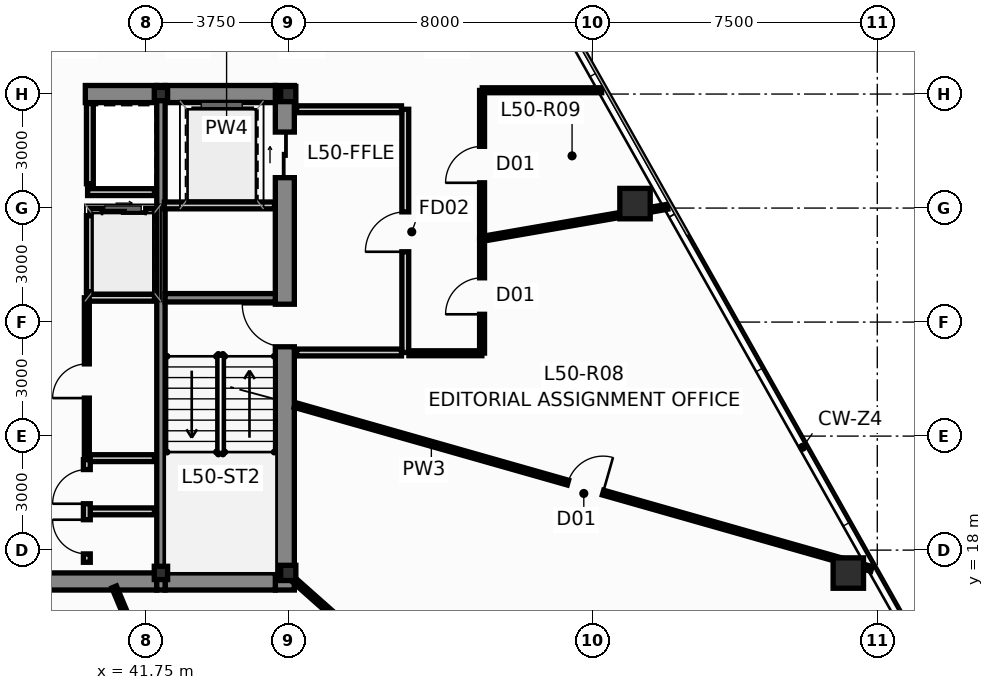
"""IFC4 building model, lengths in metres.
Left out: names, types, materials, properties, quantities, classifications, styles, units other than length and angle.
Written with IfcOpenShell. Run it as: python <this file> out.ifc"""

import sys

from ifc_helpers import new_model, si_unit, direction, frame, frame_2d, origin, origin_2d, place, context, subcontext, project, spatial, rectangle, hollow_rectangle, i_section, extrude, source, transform, mapped, element, fill, save


model = new_model("IFC4")
c1 = context("Model", 3, precision=1e-05, world=origin(), true_north=direction((0.0, 1.0)))
c2 = subcontext(c1, "Body", "Model", "MODEL_VIEW")
j1 = project(units=[si_unit("LENGTHUNIT", "METRE"), si_unit("PLANEANGLEUNIT", "RADIAN")], contexts=[c1])
p1 = place(None, origin())
s1 = spatial("IfcSite", under=j1, at=p1, CompositionType="ELEMENT")
p2 = place(p1, origin())
s2 = spatial("IfcBuilding", under=s1, at=p2, CompositionType="ELEMENT")
p3 = place(p2, frame((0.0, 0.0, 191.35)))
s3 = spatial("IfcBuildingStorey", under=s2, at=p3, CompositionType="ELEMENT", Elevation=191.35)
m1 = source(origin(), c2, "Body", "SweptSolid", [
    extrude(i_section(OverallWidth=0.4, OverallDepth=0.4, WebThickness=0.02, FlangeThickness=0.032, at=origin_2d()), origin(), (0.0, 0.0, 1.0), 3.65),
])
for number, where, z_axis, x_axis in (
    (1, (45.5, 17.4, 0.0), (0.0, 0.0, 1.0), (1.0, 0.0, 0.0)),
    (2, (45.5, 30.0, 0.0), (0.0, 0.0, 1.0), (1.0, 0.0, 0.0)),
):
    element("IfcColumn", number, at=place(p3, frame(where, z_axis=z_axis, x_axis=x_axis)), inside=s3, PredefinedType="COLUMN", context=c2, shape_type="MappedRepresentation", body=[
        mapped(m1, transform((0.0, 0.0, 0.0), scale=1.0)),
    ])
m2 = source(origin(), c2, "Body", "SweptSolid", [
    extrude(hollow_rectangle(XDim=0.35, YDim=0.35, WallThickness=0.016, at=origin_2d()), origin(), (0.0, 0.0, 1.0), 3.65),
])
for number, where, z_axis, x_axis in (
    (3, (42.15, 17.4, 0.0), (0.0, 0.0, 1.0), (1.0, 0.0, 0.0)),
    (4, (42.15, 30.0, 0.0), (0.0, 0.0, 1.0), (1.0, 0.0, 0.0)),
):
    element("IfcColumn", number, at=place(p3, frame(where, z_axis=z_axis, x_axis=x_axis)), inside=s3, PredefinedType="COLUMN", context=c2, shape_type="MappedRepresentation", body=[
        mapped(m2, transform((0.0, 0.0, 0.0), scale=1.0)),
    ])
p4 = place(p3, frame((45.41, 16.95, 0.0), z_axis=(0.0, 0.0, 1.0), x_axis=(0.0, 1.0, 0.0)))
e5 = element("IfcWall", 5, at=p4, inside=s3, PredefinedType="SHEAR", context=c2, shape_type="SweptSolid", body=[
    extrude(rectangle(XDim=13.275, YDim=0.5, at=frame_2d((6.638, 0.0))), origin(), (0.0, 0.0, 1.0), 3.65),
])
p5 = place(p4, frame((6.4, 0.0, 0.0)))
e6 = element("IfcOpeningElement", 6, at=p5, cuts=e5, PredefinedType="OPENING", context=c2, shape_type="SweptSolid", body=[
    extrude(rectangle(XDim=1.12, YDim=2.15, at=frame_2d((0.56, 1.075))), frame((0.0, 0.262, 0.0), z_axis=(0.0, -1.0, 0.0), x_axis=(1.0, 0.0, 0.0)), (0.0, 0.0, 1.0), 0.524),
])
p6 = place(p4, frame((10.85, 0.0, 0.0)))
e7 = element("IfcOpeningElement", 7, at=p6, cuts=e5, PredefinedType="OPENING", context=c2, shape_type="SweptSolid", body=[
    extrude(rectangle(XDim=1.2, YDim=2.2, at=frame_2d((0.6, 1.1))), frame((0.0, 0.262, 0.0), z_axis=(0.0, -1.0, 0.0), x_axis=(1.0, 0.0, 0.0)), (0.0, 0.0, 1.0), 0.524),
])
p7 = place(p3, frame((33.96, 17.175, 0.0), z_axis=(0.0, 0.0, 1.0), x_axis=(1.0, 0.0, 0.0)))
e8 = element("IfcWall", 8, at=p7, inside=s3, PredefinedType="SHEAR", context=c2, shape_type="SweptSolid", body=[
    extrude(rectangle(XDim=8.08, YDim=0.45, at=frame_2d((4.04, 0.0))), origin(), (0.0, 0.0, 1.0), 3.65),
])
p8 = place(p3, frame((42.26, 17.175, 0.0), z_axis=(0.0, 0.0, 1.0), x_axis=(1.0, 0.0, 0.0)))
e9 = element("IfcWall", 9, at=p8, inside=s3, PredefinedType="SHEAR", context=c2, shape_type="SweptSolid", body=[
    extrude(rectangle(XDim=2.9, YDim=0.45, at=frame_2d((1.45, 0.0))), origin(), (0.0, 0.0, 1.0), 3.65),
])
p9 = place(p3, frame((40.16, 30.0, 0.0), z_axis=(0.0, 0.0, 1.0), x_axis=(1.0, 0.0, 0.0)))
e10 = element("IfcWall", 10, at=p9, inside=s3, PredefinedType="SHEAR", context=c2, shape_type="SweptSolid", body=[
    extrude(rectangle(XDim=1.88, YDim=0.45, at=frame_2d((0.94, 0.0))), origin(), (0.0, 0.0, 1.0), 3.65),
])
p10 = place(p3, frame((42.26, 30.0, 0.0), z_axis=(0.0, 0.0, 1.0), x_axis=(1.0, 0.0, 0.0)))
e11 = element("IfcWall", 11, at=p10, inside=s3, PredefinedType="SHEAR", context=c2, shape_type="SweptSolid", body=[
    extrude(rectangle(XDim=2.9, YDim=0.45, at=frame_2d((1.45, 0.0))), origin(), (0.0, 0.0, 1.0), 3.65),
])
p11 = place(p3, frame((42.15, 16.95, 0.0), z_axis=(0.0, 0.0, 1.0), x_axis=(0.0, 1.0, 0.0)))
e12 = element("IfcWall", 12, at=p11, inside=s3, PredefinedType="SHEAR", context=c2, shape_type="SweptSolid", body=[
    extrude(rectangle(XDim=13.275, YDim=0.22, at=frame_2d((6.638, 0.0))), origin(), (0.0, 0.0, 1.0), 3.65),
])
p12 = place(p3, frame((42.26, 24.64, 0.0), z_axis=(0.0, 0.0, 1.0), x_axis=(1.0, 0.0, 0.0)))
e13 = element("IfcWall", 13, at=p12, inside=s3, PredefinedType="SHEAR", context=c2, shape_type="SweptSolid", body=[
    extrude(rectangle(XDim=2.9, YDim=0.22, at=frame_2d((1.45, 0.0))), origin(), (0.0, 0.0, 1.0), 3.65),
])
m3 = source(origin(), c2, "Body", "SweptSolid", [
    extrude(hollow_rectangle(XDim=0.8, YDim=0.8, WallThickness=0.045, at=origin_2d()), origin(), (0.0, 0.0, 1.0), 3.651),
])
p13 = place(p3, frame((60.238, 17.396, 0.0), z_axis=(-0.010364917199, -0.021599150033, 0.999712981415), x_axis=(0.901566609123, -0.432640323264, 0.0)))
e14 = element("IfcColumn", 14, at=p13, inside=s3, PredefinedType="COLUMN", context=c2, shape_type="MappedRepresentation", body=[
    mapped(m3, transform((0.0, 0.0, 0.0), scale=1.0)),
])
m4 = source(origin(), c2, "Body", "SweptSolid", [
    extrude(hollow_rectangle(XDim=0.8, YDim=0.8, WallThickness=0.045, at=origin_2d()), origin(), (0.0, 0.0, 1.0), 3.651),
])
p14 = place(p3, frame((54.625, 27.118, 0.0), z_axis=(-0.014913313399, -0.013776424037, 0.999793880369), x_axis=(0.678553674548, -0.734550822447, 0.0)))
e15 = element("IfcColumn", 15, at=p14, inside=s3, PredefinedType="COLUMN", context=c2, shape_type="MappedRepresentation", body=[
    mapped(m4, transform((0.0, 0.0, 0.0), scale=1.0)),
])
p15 = place(p3, frame((40.28, 26.9, 0.0), z_axis=(0.0, 0.0, 1.0), x_axis=(1.0, 0.0, 0.0)))
e16 = element("IfcWall", 16, at=p15, inside=s3, PredefinedType="PARTITIONING", context=c2, shape_type="SweptSolid", body=[
    extrude(rectangle(XDim=1.7, YDim=0.18, at=frame_2d((0.85, 0.0))), origin(), (0.0, 0.0, 1.0), 3.4),
])
p16 = place(p15, frame((0.32, 0.0, 0.0)))
e17 = element("IfcOpeningElement", 17, at=p16, cuts=e16, PredefinedType="OPENING", context=c2, shape_type="SweptSolid", body=[
    extrude(rectangle(XDim=1.15, YDim=2.2, at=frame_2d((0.575, 1.1))), frame((0.0, 0.102, 0.0), z_axis=(0.0, -1.0, 0.0), x_axis=(1.0, 0.0, 0.0)), (0.0, 0.0, 1.0), 0.204),
])
p17 = place(p3, frame((40.28, 24.8, 0.0), z_axis=(0.0, 0.0, 1.0), x_axis=(0.0, 1.0, 0.0)))
e18 = element("IfcWall", 18, at=p17, inside=s3, PredefinedType="PARTITIONING", context=c2, shape_type="SweptSolid", body=[
    extrude(rectangle(XDim=2.0, YDim=0.18, at=frame_2d((1.0, 0.0))), origin(), (0.0, 0.0, 1.0), 3.4),
])
p18 = place(p3, frame((40.2, 24.64, 0.0), z_axis=(0.0, 0.0, 1.0), x_axis=(1.0, 0.0, 0.0)))
e19 = element("IfcWall", 19, at=p18, inside=s3, PredefinedType="PARTITIONING", context=c2, shape_type="SweptSolid", body=[
    extrude(rectangle(XDim=1.78, YDim=0.18, at=frame_2d((0.89, 0.0))), origin(), (0.0, 0.0, 1.0), 3.4),
])
p19 = place(p3, frame((40.22, 27.42, 0.0), z_axis=(0.0, 0.0, 1.0), x_axis=(1.0, 0.0, 0.0)))
e20 = element("IfcWall", 20, at=p19, inside=s3, PredefinedType="PARTITIONING", context=c2, shape_type="SweptSolid", body=[
    extrude(rectangle(XDim=1.76, YDim=0.18, at=frame_2d((0.88, 0.0))), origin(), (0.0, 0.0, 1.0), 3.4),
])
p20 = place(p3, frame((40.28, 27.64, 0.0), z_axis=(0.0, 0.0, 1.0), x_axis=(0.0, 1.0, 0.0)))
e21 = element("IfcWall", 21, at=p20, inside=s3, PredefinedType="PARTITIONING", context=c2, shape_type="SweptSolid", body=[
    extrude(rectangle(XDim=2.11, YDim=0.18, at=frame_2d((1.055, 0.0))), origin(), (0.0, 0.0, 1.0), 3.4),
])
p21 = place(p3, frame((48.58, 23.2, 0.0), z_axis=(0.0, 0.0, 1.0), x_axis=(0.0, 1.0, 0.0)))
e22 = element("IfcWall", 22, at=p21, inside=s3, PredefinedType="PARTITIONING", context=c2, shape_type="SweptSolid", body=[
    extrude(rectangle(XDim=6.4, YDim=0.18, at=frame_2d((3.2, 0.0))), origin(), (0.0, 0.0, 1.0), 3.078),
])
p22 = place(p21, frame((2.65, 0.0, 0.0)))
e23 = element("IfcOpeningElement", 23, at=p22, cuts=e22, PredefinedType="OPENING", context=c2, shape_type="SweptSolid", body=[
    extrude(rectangle(XDim=1.05, YDim=2.15, at=frame_2d((0.525, 1.075))), frame((0.0, 0.102, 0.0), z_axis=(0.0, -1.0, 0.0), x_axis=(1.0, 0.0, 0.0)), (0.0, 0.0, 1.0), 0.204),
])
p23 = place(p3, frame((45.72, 23.2, 0.0), z_axis=(0.0, 0.0, 1.0), x_axis=(1.0, 0.0, 0.0)))
e24 = element("IfcWall", 24, at=p23, inside=s3, PredefinedType="PARTITIONING", context=c2, shape_type="SweptSolid", body=[
    extrude(rectangle(XDim=2.76, YDim=0.18, at=frame_2d((1.38, 0.0))), origin(), (0.0, 0.0, 1.0), 3.4),
])
p24 = place(p3, frame((45.72, 29.6, 0.0), z_axis=(0.0, 0.0, 1.0), x_axis=(1.0, 0.0, 0.0)))
e25 = element("IfcWall", 25, at=p24, inside=s3, PredefinedType="PARTITIONING", context=c2, shape_type="SweptSolid", body=[
    extrude(rectangle(XDim=2.76, YDim=0.18, at=frame_2d((1.38, 0.0))), origin(), (0.0, 0.0, 1.0), 2.925),
])
p25 = place(p3, frame((42.24, 27.07, 0.0), z_axis=(0.0, 0.0, 1.0), x_axis=(1.0, 0.0, 0.0)))
e26 = element("IfcWall", 26, at=p25, inside=s3, PredefinedType="PARTITIONING", context=c2, shape_type="SweptSolid", body=[
    extrude(rectangle(XDim=2.9, YDim=0.18, at=frame_2d((1.45, 0.0))), origin(), (0.0, 0.0, 1.0), 3.4),
])
p26 = place(p3, frame((40.22, 20.42, 0.0), z_axis=(0.0, 0.0, 1.0), x_axis=(1.0, 0.0, 0.0)))
e27 = element("IfcWall", 27, at=p26, inside=s3, PredefinedType="PARTITIONING", context=c2, shape_type="SweptSolid", body=[
    extrude(rectangle(XDim=1.76, YDim=0.18, at=frame_2d((0.88, 0.0))), origin(), (0.0, 0.0, 1.0), 3.4),
])
p27 = place(p3, frame((40.2, 20.5, 0.0), z_axis=(0.0, 0.0, 1.0), x_axis=(0.0, 1.0, 0.0)))
e28 = element("IfcWall", 28, at=p27, inside=s3, PredefinedType="PARTITIONING", context=c2, shape_type="SweptSolid", body=[
    extrude(rectangle(XDim=4.14, YDim=0.13, at=frame_2d((2.07, 0.0))), origin(), (0.0, 0.0, 1.0), 3.4),
])
p28 = place(p27, frame((1.5, 0.0, 0.0)))
e29 = element("IfcOpeningElement", 29, at=p28, cuts=e28, PredefinedType="OPENING", context=c2, shape_type="SweptSolid", body=[
    extrude(rectangle(XDim=0.9, YDim=2.1, at=frame_2d((0.45, 1.05))), frame((0.0, 0.077, 0.0), z_axis=(0.0, -1.0, 0.0), x_axis=(1.0, 0.0, 0.0)), (0.0, 0.0, 1.0), 0.154),
])
p29 = place(p3, frame((40.28, 19.02, 0.0), z_axis=(0.0, 0.0, 1.0), x_axis=(1.0, 0.0, 0.0)))
e30 = element("IfcWall", 30, at=p29, inside=s3, PredefinedType="PARTITIONING", context=c2, shape_type="SweptSolid", body=[
    extrude(rectangle(XDim=1.7, YDim=0.18, at=frame_2d((0.85, 0.0))), origin(), (0.0, 0.0, 1.0), 3.4),
])
p30 = place(p3, frame((40.2, 17.68, 0.0), z_axis=(0.0, 0.0, 1.0), x_axis=(0.0, 1.0, 0.0)))
e31 = element("IfcWall", 31, at=p30, inside=s3, PredefinedType="PARTITIONING", context=c2, shape_type="SweptSolid", body=[
    extrude(rectangle(XDim=2.7, YDim=0.18, at=frame_2d((1.35, 0.0))), origin(), (0.0, 0.0, 1.0), 3.4),
])
p31 = place(p30, frame((0.22, 0.0, 0.0)))
e32 = element("IfcOpeningElement", 32, at=p31, cuts=e31, PredefinedType="OPENING", context=c2, shape_type="SweptSolid", body=[
    extrude(rectangle(XDim=0.9, YDim=2.1, at=frame_2d((0.45, 1.05))), frame((0.0, 0.102, 0.0), z_axis=(0.0, -1.0, 0.0), x_axis=(1.0, 0.0, 0.0)), (0.0, 0.0, 1.0), 0.204),
])
p32 = place(p30, frame((1.54, 0.0, 0.0)))
e33 = element("IfcOpeningElement", 33, at=p32, cuts=e31, PredefinedType="OPENING", context=c2, shape_type="SweptSolid", body=[
    extrude(rectangle(XDim=0.9, YDim=2.1, at=frame_2d((0.45, 1.05))), frame((0.0, 0.102, 0.0), z_axis=(0.0, -1.0, 0.0), x_axis=(1.0, 0.0, 0.0)), (0.0, 0.0, 1.0), 0.204),
])
p33 = place(p3, frame((45.672, 21.819, 0.0), z_axis=(0.0, 0.0, 1.0), x_axis=(0.961885741186, -0.273451679282, 0.0)))
e34 = element("IfcWall", 34, at=p33, inside=s3, PredefinedType="PARTITIONING", context=c2, shape_type="SweptSolid", body=[
    extrude(rectangle(XDim=15.777, YDim=0.13, at=frame_2d((7.888, 0.0))), origin(), (0.0, 0.0, 1.0), 3.4),
])
p34 = place(p33, frame((7.472, 0.0, 0.0)))
e35 = element("IfcOpeningElement", 35, at=p34, cuts=e34, PredefinedType="OPENING", context=c2, shape_type="SweptSolid", body=[
    extrude(rectangle(XDim=0.96, YDim=2.15, at=frame_2d((0.48, 1.075))), frame((0.0, 0.077, 0.0), z_axis=(0.0, -1.0, 0.0), x_axis=(1.0, 0.0, 0.0)), (0.0, 0.0, 1.0), 0.154),
])
p35 = place(p3, frame((45.656, 17.21, 0.0), z_axis=(0.0, 0.0, 1.0), x_axis=(0.748196325474, -0.663477398671, 0.0)))
e36 = element("IfcWall", 36, at=p35, inside=s3, PredefinedType="PARTITIONING", context=c2, shape_type="SweptSolid", body=[
    extrude(rectangle(XDim=14.778, YDim=0.13, at=frame_2d((7.389, 0.0))), origin(), (0.0, 0.0, 1.0), 2.925),
])
p36 = place(p3, frame((40.919, 17.031, 0.0), z_axis=(0.0, 0.0, 1.0), x_axis=(0.385652967591, -0.922643912129, 0.0)))
e37 = element("IfcWall", 37, at=p36, inside=s3, PredefinedType="PARTITIONING", context=c2, shape_type="SweptSolid", body=[
    extrude(rectangle(XDim=10.657, YDim=0.13, at=frame_2d((5.329, 0.0))), origin(), (0.0, 0.0, 1.0), 3.4),
])
p37 = place(p36, frame((4.902, 0.0, 0.0)))
e38 = element("IfcOpeningElement", 38, at=p37, cuts=e37, PredefinedType="OPENING", context=c2, shape_type="SweptSolid", body=[
    extrude(rectangle(XDim=0.96, YDim=2.15, at=frame_2d((0.48, 1.075))), frame((0.0, 0.077, 0.0), z_axis=(0.0, -1.0, 0.0), x_axis=(1.0, 0.0, 0.0)), (0.0, 0.0, 1.0), 0.154),
])
p38 = place(p3, frame((50.605, 26.191, 0.0), z_axis=(0.0, 0.0, 1.0), x_axis=(0.985362153608, 0.170474121899, 0.0)))
e39 = element("IfcWall", 39, at=p38, inside=s3, PredefinedType="PARTITIONING", context=c2, shape_type="SweptSolid", body=[
    extrude(rectangle(XDim=4.944, YDim=0.13, at=frame_2d((2.472, 0.0))), origin(), (0.0, 0.0, 1.0), 3.4),
])
p39 = place(p3, frame((50.6, 26.195, 0.0), z_axis=(0.0, 0.0, 1.0), x_axis=(0.0, 1.0, 0.0)))
e40 = element("IfcWall", 40, at=p39, inside=s3, PredefinedType="PARTITIONING", context=c2, shape_type="SweptSolid", body=[
    extrude(rectangle(XDim=3.9, YDim=0.13, at=frame_2d((1.95, 0.0))), origin(), (0.0, 0.0, 1.0), 3.078),
])
p40 = place(p39, frame((1.47, 0.0, 0.0)))
e41 = element("IfcOpeningElement", 41, at=p40, cuts=e40, PredefinedType="OPENING", context=c2, shape_type="SweptSolid", body=[
    extrude(rectangle(XDim=0.96, YDim=2.15, at=frame_2d((0.48, 1.075))), frame((0.0, 0.077, 0.0), z_axis=(0.0, -1.0, 0.0), x_axis=(1.0, 0.0, 0.0)), (0.0, 0.0, 1.0), 0.154),
])
p41 = place(p3, frame((50.605, 30.1, 0.0), z_axis=(0.0, 0.0, 1.0), x_axis=(1.0, 0.0, 0.0)))
e42 = element("IfcWall", 42, at=p41, inside=s3, PredefinedType="PARTITIONING", context=c2, shape_type="SweptSolid", body=[
    extrude(rectangle(XDim=3.143, YDim=0.13, at=frame_2d((1.572, 0.0))), origin(), (0.0, 0.0, 1.0), 3.4),
])
p42 = place(p3, frame((50.6, 23.185, 0.0), z_axis=(0.0, 0.0, 1.0), x_axis=(0.0, 1.0, 0.0)))
e43 = element("IfcWall", 43, at=p42, inside=s3, PredefinedType="PARTITIONING", context=c2, shape_type="SweptSolid", body=[
    extrude(rectangle(XDim=3.0, YDim=0.13, at=frame_2d((1.5, 0.0))), origin(), (0.0, 0.0, 1.0), 3.078),
])
p43 = place(p42, frame((1.02, 0.0, 0.0)))
e44 = element("IfcOpeningElement", 44, at=p43, cuts=e43, PredefinedType="OPENING", context=c2, shape_type="SweptSolid", body=[
    extrude(rectangle(XDim=0.96, YDim=2.15, at=frame_2d((0.48, 1.075))), frame((0.0, 0.077, 0.0), z_axis=(0.0, -1.0, 0.0), x_axis=(1.0, 0.0, 0.0)), (0.0, 0.0, 1.0), 0.154),
])
p44 = place(p3, frame((48.675, 23.18, 0.0), z_axis=(0.0, 0.0, 1.0), x_axis=(1.0, 0.0, 0.0)))
e45 = element("IfcWall", 45, at=p44, inside=s3, PredefinedType="PARTITIONING", context=c2, shape_type="SweptSolid", body=[
    extrude(rectangle(XDim=1.92, YDim=0.13, at=frame_2d((0.96, 0.0))), origin(), (0.0, 0.0, 1.0), 3.4),
])
p45 = place(p5, origin())
e46 = element("IfcDoor", 46, at=p45, inside=s3, OperationType="SINGLE_SWING_RIGHT", PredefinedType="DOOR", context=c2, shape_type="SweptSolid", body=[
    extrude(rectangle(XDim=1.12, YDim=2.15, at=frame_2d((0.56, 1.075))), frame((0.0, 0.025, 0.0), z_axis=(0.0, -1.0, 0.0), x_axis=(1.0, 0.0, 0.0)), (0.0, 0.0, 1.0), 0.05),
])
fill(e6, e46)
p46 = place(p6, origin())
e47 = element("IfcDoor", 47, at=p46, inside=s3, OperationType="SLIDING_TO_RIGHT", PredefinedType="DOOR", context=c2, shape_type="SweptSolid", body=[
    extrude(rectangle(XDim=1.2, YDim=2.2, at=frame_2d((0.6, 1.1))), frame((0.0, 0.025, 0.0), z_axis=(0.0, -1.0, 0.0), x_axis=(1.0, 0.0, 0.0)), (0.0, 0.0, 1.0), 0.05),
])
fill(e7, e47)
p47 = place(p16, origin())
e48 = element("IfcDoor", 48, at=p47, inside=s3, OperationType="SLIDING_TO_LEFT", PredefinedType="DOOR", context=c2, shape_type="SweptSolid", body=[
    extrude(rectangle(XDim=1.15, YDim=2.2, at=frame_2d((0.575, 1.1))), frame((0.0, 0.025, 0.0), z_axis=(0.0, -1.0, 0.0), x_axis=(1.0, 0.0, 0.0)), (0.0, 0.0, 1.0), 0.05),
])
fill(e17, e48)
p48 = place(p22, origin())
e49 = element("IfcDoor", 49, at=p48, inside=s3, OperationType="SINGLE_SWING_LEFT", PredefinedType="DOOR", context=c2, shape_type="SweptSolid", body=[
    extrude(rectangle(XDim=1.05, YDim=2.15, at=frame_2d((0.525, 1.075))), frame((0.0, 0.025, 0.0), z_axis=(0.0, -1.0, 0.0), x_axis=(1.0, 0.0, 0.0)), (0.0, 0.0, 1.0), 0.05),
])
fill(e23, e49)
p49 = place(p28, origin())
e50 = element("IfcDoor", 50, at=p49, inside=s3, OperationType="SINGLE_SWING_LEFT", PredefinedType="DOOR", context=c2, shape_type="SweptSolid", body=[
    extrude(rectangle(XDim=0.9, YDim=2.1, at=frame_2d((0.45, 1.05))), frame((0.0, 0.025, 0.0), z_axis=(0.0, -1.0, 0.0), x_axis=(1.0, 0.0, 0.0)), (0.0, 0.0, 1.0), 0.05),
])
fill(e29, e50)
p50 = place(p31, origin())
e51 = element("IfcDoor", 51, at=p50, inside=s3, OperationType="SINGLE_SWING_RIGHT", PredefinedType="DOOR", context=c2, shape_type="SweptSolid", body=[
    extrude(rectangle(XDim=0.9, YDim=2.1, at=frame_2d((0.45, 1.05))), frame((0.0, 0.025, 0.0), z_axis=(0.0, -1.0, 0.0), x_axis=(1.0, 0.0, 0.0)), (0.0, 0.0, 1.0), 0.05),
])
fill(e32, e51)
p51 = place(p32, origin())
e52 = element("IfcDoor", 52, at=p51, inside=s3, OperationType="SINGLE_SWING_LEFT", PredefinedType="DOOR", context=c2, shape_type="SweptSolid", body=[
    extrude(rectangle(XDim=0.9, YDim=2.1, at=frame_2d((0.45, 1.05))), frame((0.0, 0.025, 0.0), z_axis=(0.0, -1.0, 0.0), x_axis=(1.0, 0.0, 0.0)), (0.0, 0.0, 1.0), 0.05),
])
fill(e33, e52)
p52 = place(p34, origin())
e53 = element("IfcDoor", 53, at=p52, inside=s3, OperationType="SINGLE_SWING_RIGHT", PredefinedType="DOOR", context=c2, shape_type="SweptSolid", body=[
    extrude(rectangle(XDim=0.96, YDim=2.15, at=frame_2d((0.48, 1.075))), frame((0.0, 0.025, 0.0), z_axis=(0.0, -1.0, 0.0), x_axis=(1.0, 0.0, 0.0)), (0.0, 0.0, 1.0), 0.05),
])
fill(e35, e53)
p53 = place(p40, origin())
e54 = element("IfcDoor", 54, at=p53, inside=s3, OperationType="SINGLE_SWING_LEFT", PredefinedType="DOOR", context=c2, shape_type="SweptSolid", body=[
    extrude(rectangle(XDim=0.96, YDim=2.15, at=frame_2d((0.48, 1.075))), frame((0.0, 0.025, 0.0), z_axis=(0.0, -1.0, 0.0), x_axis=(1.0, 0.0, 0.0)), (0.0, 0.0, 1.0), 0.05),
])
fill(e41, e54)
p54 = place(p43, origin())
e55 = element("IfcDoor", 55, at=p54, inside=s3, OperationType="SINGLE_SWING_LEFT", PredefinedType="DOOR", context=c2, shape_type="SweptSolid", body=[
    extrude(rectangle(XDim=0.96, YDim=2.15, at=frame_2d((0.48, 1.075))), frame((0.0, 0.025, 0.0), z_axis=(0.0, -1.0, 0.0), x_axis=(1.0, 0.0, 0.0)), (0.0, 0.0, 1.0), 0.05),
])
fill(e44, e55)
save(model, sys.argv[1])
